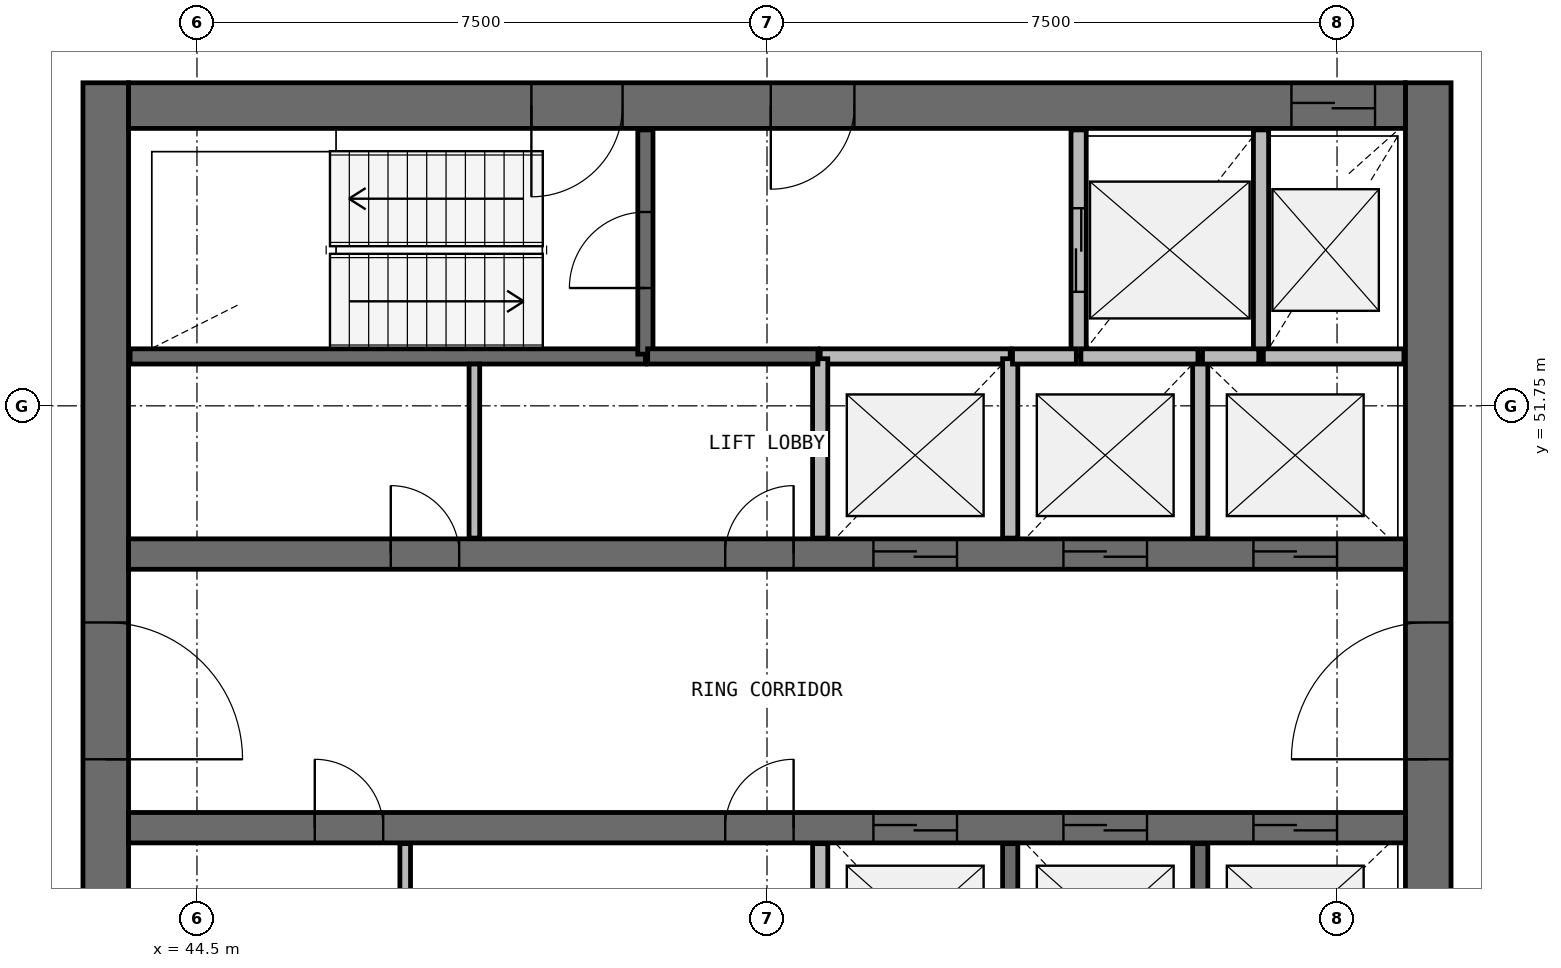
"""IFC4 building model, lengths in metres.
Left out: names, types, materials, properties, quantities, classifications, styles, units other than length and angle.
Written with IfcOpenShell. Run it as: python <this file> out.ifc"""

import sys

from ifc_helpers import new_model, si_unit, direction, frame, frame_2d, origin, place, context, subcontext, project, spatial, rectangle, extrude, source, transform, mapped, element, fill, save


model = new_model("IFC4")
c1 = context("Model", 3, precision=1e-05, world=origin(), true_north=direction((0.0, 1.0)))
c2 = subcontext(c1, "Body", "Model", "MODEL_VIEW")
j1 = project(units=[si_unit("LENGTHUNIT", "METRE"), si_unit("PLANEANGLEUNIT", "RADIAN")], contexts=[c1])
p1 = place(None, origin())
s1 = spatial("IfcSite", under=j1, at=p1, CompositionType="ELEMENT")
p2 = place(p1, origin())
s2 = spatial("IfcBuilding", under=s1, at=p2, CompositionType="ELEMENT")
p3 = place(p2, frame((0.0, 0.0, 222.8)))
s3 = spatial("IfcBuildingStorey", under=s2, at=p3, CompositionType="ELEMENT", Elevation=222.8)
p4 = place(p3, frame((60.7, 40.0, 0.0), z_axis=(0.0, 0.0, 1.0), x_axis=(0.0, 1.0, 0.0)))
e1 = element("IfcWall", 1, at=p4, inside=s3, PredefinedType="SHEAR", context=c2, shape_type="SweptSolid", body=[
    extrude(rectangle(XDim=16.0, YDim=0.6, at=frame_2d((8.0, 0.0))), origin(), (0.0, 0.0, 1.0), 3.9),
])
p5 = place(p4, frame((7.1, 0.0, 0.0)))
e2 = element("IfcOpeningElement", 2, at=p5, cuts=e1, PredefinedType="OPENING", context=c2, shape_type="SweptSolid", body=[
    extrude(rectangle(XDim=1.8, YDim=2.1, at=frame_2d((0.9, 1.05))), frame((0.0, 0.31, 0.0), z_axis=(0.0, -1.0, 0.0), x_axis=(1.0, 0.0, 0.0)), (0.0, 0.0, 1.0), 0.62),
])
p6 = place(p3, frame((43.3, 56.0, 0.0), z_axis=(0.0, 0.0, 1.0), x_axis=(0.0, -1.0, 0.0)))
e3 = element("IfcWall", 3, at=p6, inside=s3, PredefinedType="SHEAR", context=c2, shape_type="SweptSolid", body=[
    extrude(rectangle(XDim=16.0, YDim=0.6, at=frame_2d((8.0, 0.0))), origin(), (0.0, 0.0, 1.0), 3.9),
])
p7 = place(p6, frame((7.1, 0.0, 0.0)))
e4 = element("IfcOpeningElement", 4, at=p7, cuts=e3, PredefinedType="OPENING", context=c2, shape_type="SweptSolid", body=[
    extrude(rectangle(XDim=1.8, YDim=2.1, at=frame_2d((0.9, 1.05))), frame((0.0, 0.31, 0.0), z_axis=(0.0, -1.0, 0.0), x_axis=(1.0, 0.0, 0.0)), (0.0, 0.0, 1.0), 0.62),
])
p8 = place(p3, frame((60.4, 55.7, 0.0), z_axis=(0.0, 0.0, 1.0), x_axis=(-1.0, 0.0, 0.0)))
e5 = element("IfcWall", 5, at=p8, inside=s3, PredefinedType="SHEAR", context=c2, shape_type="SweptSolid", body=[
    extrude(rectangle(XDim=16.8, YDim=0.6, at=frame_2d((8.4, 0.0))), origin(), (0.0, 0.0, 1.0), 3.9),
])
p9 = place(p8, frame((0.4, 0.0, 0.0)))
e6 = element("IfcOpeningElement", 6, at=p9, cuts=e5, PredefinedType="OPENING", context=c2, shape_type="SweptSolid", body=[
    extrude(rectangle(XDim=1.1, YDim=2.1, at=frame_2d((0.55, 1.05))), frame((0.0, 0.31, 0.0), z_axis=(0.0, -1.0, 0.0), x_axis=(1.0, 0.0, 0.0)), (0.0, 0.0, 1.0), 0.62),
])
p10 = place(p8, frame((10.3, 0.0, 0.0)))
e7 = element("IfcOpeningElement", 7, at=p10, cuts=e5, PredefinedType="OPENING", context=c2, shape_type="SweptSolid", body=[
    extrude(rectangle(XDim=1.2, YDim=2.1, at=frame_2d((0.6, 1.05))), frame((0.0, 0.31, 0.0), z_axis=(0.0, -1.0, 0.0), x_axis=(1.0, 0.0, 0.0)), (0.0, 0.0, 1.0), 0.62),
])
p11 = place(p8, frame((7.25, 0.0, 0.0)))
e8 = element("IfcOpeningElement", 8, at=p11, cuts=e5, PredefinedType="OPENING", context=c2, shape_type="SweptSolid", body=[
    extrude(rectangle(XDim=1.1, YDim=2.1, at=frame_2d((0.55, 1.05))), frame((0.0, 0.31, 0.0), z_axis=(0.0, -1.0, 0.0), x_axis=(1.0, 0.0, 0.0)), (0.0, 0.0, 1.0), 0.62),
])
p12 = place(p3, frame((43.6, 49.8, 0.0), z_axis=(0.0, 0.0, 1.0), x_axis=(1.0, 0.0, 0.0)))
e9 = element("IfcWall", 9, at=p12, inside=s3, PredefinedType="SHEAR", context=c2, shape_type="SweptSolid", body=[
    extrude(rectangle(XDim=16.8, YDim=0.4, at=frame_2d((8.4, 0.0))), origin(), (0.0, 0.0, 1.0), 3.9),
])
p13 = place(p12, frame((9.8, 0.0, 0.0)))
e10 = element("IfcOpeningElement", 10, at=p13, cuts=e9, PredefinedType="OPENING", context=c2, shape_type="SweptSolid", body=[
    extrude(rectangle(XDim=1.1, YDim=2.1, at=frame_2d((0.55, 1.05))), frame((0.0, 0.21, 0.0), z_axis=(0.0, -1.0, 0.0), x_axis=(1.0, 0.0, 0.0)), (0.0, 0.0, 1.0), 0.42),
])
p14 = place(p12, frame((12.3, 0.0, 0.0)))
e11 = element("IfcOpeningElement", 11, at=p14, cuts=e9, PredefinedType="OPENING", context=c2, shape_type="SweptSolid", body=[
    extrude(rectangle(XDim=1.1, YDim=2.1, at=frame_2d((0.55, 1.05))), frame((0.0, 0.21, 0.0), z_axis=(0.0, -1.0, 0.0), x_axis=(1.0, 0.0, 0.0)), (0.0, 0.0, 1.0), 0.42),
])
p15 = place(p12, frame((14.8, 0.0, 0.0)))
e12 = element("IfcOpeningElement", 12, at=p15, cuts=e9, PredefinedType="OPENING", context=c2, shape_type="SweptSolid", body=[
    extrude(rectangle(XDim=1.1, YDim=2.1, at=frame_2d((0.55, 1.05))), frame((0.0, 0.21, 0.0), z_axis=(0.0, -1.0, 0.0), x_axis=(1.0, 0.0, 0.0)), (0.0, 0.0, 1.0), 0.42),
])
p16 = place(p12, frame((3.45, 0.0, 0.0)))
e13 = element("IfcOpeningElement", 13, at=p16, cuts=e9, PredefinedType="OPENING", context=c2, shape_type="SweptSolid", body=[
    extrude(rectangle(XDim=0.9, YDim=2.1, at=frame_2d((0.45, 1.05))), frame((0.0, 0.21, 0.0), z_axis=(0.0, -1.0, 0.0), x_axis=(1.0, 0.0, 0.0)), (0.0, 0.0, 1.0), 0.42),
])
p17 = place(p12, frame((7.85, 0.0, 0.0)))
e14 = element("IfcOpeningElement", 14, at=p17, cuts=e9, PredefinedType="OPENING", context=c2, shape_type="SweptSolid", body=[
    extrude(rectangle(XDim=0.9, YDim=2.1, at=frame_2d((0.45, 1.05))), frame((0.0, 0.21, 0.0), z_axis=(0.0, -1.0, 0.0), x_axis=(1.0, 0.0, 0.0)), (0.0, 0.0, 1.0), 0.42),
])
p18 = place(p3, frame((43.6, 46.2, 0.0), z_axis=(0.0, 0.0, 1.0), x_axis=(1.0, 0.0, 0.0)))
e15 = element("IfcWall", 15, at=p18, inside=s3, PredefinedType="SHEAR", context=c2, shape_type="SweptSolid", body=[
    extrude(rectangle(XDim=16.8, YDim=0.4, at=frame_2d((8.4, 0.0))), origin(), (0.0, 0.0, 1.0), 3.9),
])
p19 = place(p18, frame((9.8, 0.0, 0.0)))
e16 = element("IfcOpeningElement", 16, at=p19, cuts=e15, PredefinedType="OPENING", context=c2, shape_type="SweptSolid", body=[
    extrude(rectangle(XDim=1.1, YDim=2.1, at=frame_2d((0.55, 1.05))), frame((0.0, 0.21, 0.0), z_axis=(0.0, -1.0, 0.0), x_axis=(1.0, 0.0, 0.0)), (0.0, 0.0, 1.0), 0.42),
])
p20 = place(p18, frame((12.3, 0.0, 0.0)))
e17 = element("IfcOpeningElement", 17, at=p20, cuts=e15, PredefinedType="OPENING", context=c2, shape_type="SweptSolid", body=[
    extrude(rectangle(XDim=1.1, YDim=2.1, at=frame_2d((0.55, 1.05))), frame((0.0, 0.21, 0.0), z_axis=(0.0, -1.0, 0.0), x_axis=(1.0, 0.0, 0.0)), (0.0, 0.0, 1.0), 0.42),
])
p21 = place(p18, frame((14.8, 0.0, 0.0)))
e18 = element("IfcOpeningElement", 18, at=p21, cuts=e15, PredefinedType="OPENING", context=c2, shape_type="SweptSolid", body=[
    extrude(rectangle(XDim=1.1, YDim=2.1, at=frame_2d((0.55, 1.05))), frame((0.0, 0.21, 0.0), z_axis=(0.0, -1.0, 0.0), x_axis=(1.0, 0.0, 0.0)), (0.0, 0.0, 1.0), 0.42),
])
p22 = place(p18, frame((2.45, 0.0, 0.0)))
e19 = element("IfcOpeningElement", 19, at=p22, cuts=e15, PredefinedType="OPENING", context=c2, shape_type="SweptSolid", body=[
    extrude(rectangle(XDim=0.9, YDim=2.1, at=frame_2d((0.45, 1.05))), frame((0.0, 0.21, 0.0), z_axis=(0.0, -1.0, 0.0), x_axis=(1.0, 0.0, 0.0)), (0.0, 0.0, 1.0), 0.42),
])
p23 = place(p18, frame((7.85, 0.0, 0.0)))
e20 = element("IfcOpeningElement", 20, at=p23, cuts=e15, PredefinedType="OPENING", context=c2, shape_type="SweptSolid", body=[
    extrude(rectangle(XDim=0.9, YDim=2.1, at=frame_2d((0.45, 1.05))), frame((0.0, 0.21, 0.0), z_axis=(0.0, -1.0, 0.0), x_axis=(1.0, 0.0, 0.0)), (0.0, 0.0, 1.0), 0.42),
])
p24 = place(p3, frame((43.62, 52.4, 0.0), z_axis=(0.0, 0.0, 1.0), x_axis=(1.0, 0.0, 0.0)))
e21 = element("IfcWall", 21, at=p24, inside=s3, PredefinedType="SOLIDWALL", context=c2, shape_type="SweptSolid", body=[
    extrude(rectangle(XDim=6.78, YDim=0.2, at=frame_2d((3.39, 0.0))), origin(), (0.0, 0.0, 1.0), 3.58),
])
p25 = place(p3, frame((50.4, 52.43, 0.0), z_axis=(0.0, 0.0, 1.0), x_axis=(0.0, 1.0, 0.0)))
e22 = element("IfcWall", 22, at=p25, inside=s3, PredefinedType="SOLIDWALL", context=c2, shape_type="SweptSolid", body=[
    extrude(rectangle(XDim=2.95, YDim=0.2, at=frame_2d((1.475, 0.0))), origin(), (0.0, 0.0, 1.0), 3.58),
])
p26 = place(p25, frame((0.87, 0.0, 0.0)))
e23 = element("IfcOpeningElement", 23, at=p26, cuts=e22, PredefinedType="OPENING", context=c2, shape_type="SweptSolid", body=[
    extrude(rectangle(XDim=1.0, YDim=2.1, at=frame_2d((0.5, 1.05))), frame((0.0, 0.11, 0.0), z_axis=(0.0, -1.0, 0.0), x_axis=(1.0, 0.0, 0.0)), (0.0, 0.0, 1.0), 0.22),
])
p27 = place(p3, frame((56.1, 55.38, 0.0), z_axis=(0.0, 0.0, 1.0), x_axis=(0.0, -1.0, 0.0)))
e24 = element("IfcWall", 24, at=p27, inside=s3, PredefinedType="SOLIDWALL", context=c2, shape_type="SweptSolid", body=[
    extrude(rectangle(XDim=2.98, YDim=0.2, at=frame_2d((1.49, 0.0))), origin(), (0.0, 0.0, 1.0), 3.58),
])
p28 = place(p27, frame((1.03, 0.0, 0.0)))
e25 = element("IfcOpeningElement", 25, at=p28, cuts=e24, PredefinedType="OPENING", context=c2, shape_type="SweptSolid", body=[
    extrude(rectangle(XDim=1.1, YDim=2.1, at=frame_2d((0.55, 1.05))), frame((0.0, 0.11, 0.0), z_axis=(0.0, -1.0, 0.0), x_axis=(1.0, 0.0, 0.0)), (0.0, 0.0, 1.0), 0.22),
])
p29 = place(p3, frame((58.5, 52.4, 0.0), z_axis=(0.0, 0.0, 1.0), x_axis=(0.0, 1.0, 0.0)))
e26 = element("IfcWall", 26, at=p29, inside=s3, PredefinedType="SOLIDWALL", context=c2, shape_type="SweptSolid", body=[
    extrude(rectangle(XDim=2.98, YDim=0.2, at=frame_2d((1.49, 0.0))), origin(), (0.0, 0.0, 1.0), 3.58),
])
p30 = place(p3, frame((55.2, 52.4, 0.0), z_axis=(0.0, 0.0, 1.0), x_axis=(-1.0, 0.0, 0.0)))
e27 = element("IfcWall", 27, at=p30, inside=s3, PredefinedType="SOLIDWALL", context=c2, shape_type="SweptSolid", body=[
    extrude(rectangle(XDim=2.5, YDim=0.2, at=frame_2d((1.25, 0.0))), origin(), (0.0, 0.0, 1.0), 3.58),
])
for number, where, z_axis, x_axis in (
    (28, (52.7, 45.99, 0.0), (0.0, 0.0, 1.0), (0.0, -1.0, 0.0)),
    (29, (52.7, 52.37, 0.0), (0.0, 0.0, 1.0), (0.0, -1.0, 0.0)),
    (30, (55.2, 43.63, 0.0), (0.0, 0.0, 1.0), (0.0, 1.0, 0.0)),
    (31, (55.2, 50.01, 0.0), (0.0, 0.0, 1.0), (0.0, 1.0, 0.0)),
    (32, (57.7, 43.63, 0.0), (0.0, 0.0, 1.0), (0.0, 1.0, 0.0)),
):
    element("IfcWall", number, at=place(p3, frame(where, z_axis=z_axis, x_axis=x_axis)), inside=s3, PredefinedType="SOLIDWALL", context=c2, shape_type="SweptSolid", body=[
        extrude(rectangle(XDim=2.36, YDim=0.2, at=frame_2d((1.18, 0.0))), origin(), (0.0, 0.0, 1.0), 3.58),
    ])
p31 = place(p3, frame((57.7, 50.01, 0.0), z_axis=(0.0, 0.0, 1.0), x_axis=(0.0, 1.0, 0.0)))
e33 = element("IfcWall", 33, at=p31, inside=s3, PredefinedType="SOLIDWALL", context=c2, shape_type="SweptSolid", body=[
    extrude(rectangle(XDim=2.39, YDim=0.2, at=frame_2d((1.195, 0.0))), origin(), (0.0, 0.0, 1.0), 3.58),
])
p32 = place(p3, frame((50.43, 52.4, 0.0), z_axis=(0.0, 0.0, 1.0), x_axis=(1.0, 0.0, 0.0)))
e34 = element("IfcWall", 34, at=p32, inside=s3, PredefinedType="SOLIDWALL", context=c2, shape_type="SweptSolid", body=[
    extrude(rectangle(XDim=2.24, YDim=0.2, at=frame_2d((1.12, 0.0))), origin(), (0.0, 0.0, 1.0), 3.58),
])
p33 = place(p3, frame((60.38, 52.4, 0.0), z_axis=(0.0, 0.0, 1.0), x_axis=(-1.0, 0.0, 0.0)))
e35 = element("IfcWall", 35, at=p33, inside=s3, PredefinedType="SOLIDWALL", context=c2, shape_type="SweptSolid", body=[
    extrude(rectangle(XDim=1.85, YDim=0.2, at=frame_2d((0.925, 0.0))), origin(), (0.0, 0.0, 1.0), 3.58),
])
p34 = place(p3, frame((57.67, 52.4, 0.0), z_axis=(0.0, 0.0, 1.0), x_axis=(-1.0, 0.0, 0.0)))
e36 = element("IfcWall", 36, at=p34, inside=s3, PredefinedType="SOLIDWALL", context=c2, shape_type="SweptSolid", body=[
    extrude(rectangle(XDim=1.54, YDim=0.2, at=frame_2d((0.77, 0.0))), origin(), (0.0, 0.0, 1.0), 3.58),
])
p35 = place(p3, frame((56.07, 52.4, 0.0), z_axis=(0.0, 0.0, 1.0), x_axis=(-1.0, 0.0, 0.0)))
e37 = element("IfcWall", 37, at=p35, inside=s3, PredefinedType="SOLIDWALL", context=c2, shape_type="SweptSolid", body=[
    extrude(rectangle(XDim=0.84, YDim=0.2, at=frame_2d((0.42, 0.0))), origin(), (0.0, 0.0, 1.0), 3.58),
])
p36 = place(p3, frame((58.47, 52.4, 0.0), z_axis=(0.0, 0.0, 1.0), x_axis=(-1.0, 0.0, 0.0)))
e38 = element("IfcWall", 38, at=p36, inside=s3, PredefinedType="SOLIDWALL", context=c2, shape_type="SweptSolid", body=[
    extrude(rectangle(XDim=0.74, YDim=0.2, at=frame_2d((0.37, 0.0))), origin(), (0.0, 0.0, 1.0), 3.58),
])
for number, where, z_axis, x_axis in (
    (39, (47.24, 43.7, 0.0), (0.0, 0.0, 1.0), (0.0, 1.0, 0.0)),
    (40, (48.15, 50.01, 0.0), (0.0, 0.0, 1.0), (0.0, 1.0, 0.0)),
):
    element("IfcWall", number, at=place(p3, frame(where, z_axis=z_axis, x_axis=x_axis)), inside=s3, PredefinedType="PARTITIONING", context=c2, shape_type="SweptSolid", body=[
        extrude(rectangle(XDim=2.29, YDim=0.14, at=frame_2d((1.145, 0.0))), origin(), (0.0, 0.0, 1.0), 2.88),
    ])
m1 = source(origin(), c2, "Body", "SweptSolid", [
    extrude(rectangle(XDim=1.8, YDim=2.1, at=frame_2d((0.9, 1.05))), frame((0.0, 0.025, 0.0), z_axis=(0.0, -1.0, 0.0), x_axis=(1.0, 0.0, 0.0)), (0.0, 0.0, 1.0), 0.05),
])
p37 = place(p7, origin())
e41 = element("IfcDoor", 41, at=p37, inside=s3, OperationType="SINGLE_SWING_RIGHT", PredefinedType="DOOR", context=c2, shape_type="MappedRepresentation", body=[
    mapped(m1, transform((0.0, 0.0, 0.0), scale=1.0)),
])
fill(e4, e41)
p38 = place(p5, origin())
e42 = element("IfcDoor", 42, at=p38, inside=s3, OperationType="SINGLE_SWING_LEFT", PredefinedType="DOOR", context=c2, shape_type="MappedRepresentation", body=[
    mapped(m1, transform((0.0, 0.0, 0.0), scale=1.0)),
])
fill(e2, e42)
m2 = source(origin(), c2, "Body", "SweptSolid", [
    extrude(rectangle(XDim=1.1, YDim=2.1, at=frame_2d((0.55, 1.05))), frame((0.0, 0.025, 0.0), z_axis=(0.0, -1.0, 0.0), x_axis=(1.0, 0.0, 0.0)), (0.0, 0.0, 1.0), 0.05),
])
p39 = place(p13, origin())
e43 = element("IfcDoor", 43, at=p39, inside=s3, OperationType="DOUBLE_DOOR_SLIDING", PredefinedType="USERDEFINED", context=c2, shape_type="MappedRepresentation", body=[
    mapped(m2, transform((0.0, 0.0, 0.0), scale=1.0)),
])
fill(e10, e43)
p40 = place(p14, origin())
e44 = element("IfcDoor", 44, at=p40, inside=s3, OperationType="DOUBLE_DOOR_SLIDING", PredefinedType="USERDEFINED", context=c2, shape_type="MappedRepresentation", body=[
    mapped(m2, transform((0.0, 0.0, 0.0), scale=1.0)),
])
fill(e11, e44)
p41 = place(p15, origin())
e45 = element("IfcDoor", 45, at=p41, inside=s3, OperationType="DOUBLE_DOOR_SLIDING", PredefinedType="USERDEFINED", context=c2, shape_type="MappedRepresentation", body=[
    mapped(m2, transform((0.0, 0.0, 0.0), scale=1.0)),
])
fill(e12, e45)
p42 = place(p19, origin())
e46 = element("IfcDoor", 46, at=p42, inside=s3, OperationType="DOUBLE_DOOR_SLIDING", PredefinedType="USERDEFINED", context=c2, shape_type="MappedRepresentation", body=[
    mapped(m2, transform((0.0, 0.0, 0.0), scale=1.0)),
])
fill(e16, e46)
p43 = place(p20, origin())
e47 = element("IfcDoor", 47, at=p43, inside=s3, OperationType="DOUBLE_DOOR_SLIDING", PredefinedType="USERDEFINED", context=c2, shape_type="MappedRepresentation", body=[
    mapped(m2, transform((0.0, 0.0, 0.0), scale=1.0)),
])
fill(e17, e47)
p44 = place(p21, origin())
e48 = element("IfcDoor", 48, at=p44, inside=s3, OperationType="DOUBLE_DOOR_SLIDING", PredefinedType="USERDEFINED", context=c2, shape_type="MappedRepresentation", body=[
    mapped(m2, transform((0.0, 0.0, 0.0), scale=1.0)),
])
fill(e18, e48)
p45 = place(p28, origin())
e49 = element("IfcDoor", 49, at=p45, inside=s3, OperationType="DOUBLE_DOOR_SLIDING", PredefinedType="USERDEFINED", context=c2, shape_type="MappedRepresentation", body=[
    mapped(m2, transform((0.0, 0.0, 0.0), scale=1.0)),
])
fill(e25, e49)
p46 = place(p9, origin())
e50 = element("IfcDoor", 50, at=p46, inside=s3, OperationType="DOUBLE_DOOR_SLIDING", PredefinedType="USERDEFINED", context=c2, shape_type="MappedRepresentation", body=[
    mapped(m2, transform((0.0, 0.0, 0.0), scale=1.0)),
])
fill(e6, e50)
m3 = source(origin(), c2, "Body", "SweptSolid", [
    extrude(rectangle(XDim=1.2, YDim=2.1, at=frame_2d((0.6, 1.05))), frame((0.0, 0.025, 0.0), z_axis=(0.0, -1.0, 0.0), x_axis=(1.0, 0.0, 0.0)), (0.0, 0.0, 1.0), 0.05),
])
p47 = place(p10, origin())
e51 = element("IfcDoor", 51, at=p47, inside=s3, OperationType="SINGLE_SWING_RIGHT", PredefinedType="DOOR", context=c2, shape_type="MappedRepresentation", body=[
    mapped(m3, transform((0.0, 0.0, 0.0), scale=1.0)),
])
fill(e7, e51)
m4 = source(origin(), c2, "Body", "SweptSolid", [
    extrude(rectangle(XDim=1.0, YDim=2.1, at=frame_2d((0.5, 1.05))), frame((0.0, 0.025, 0.0), z_axis=(0.0, -1.0, 0.0), x_axis=(1.0, 0.0, 0.0)), (0.0, 0.0, 1.0), 0.05),
])
p48 = place(p26, origin())
e52 = element("IfcDoor", 52, at=p48, inside=s3, OperationType="SINGLE_SWING_LEFT", PredefinedType="DOOR", context=c2, shape_type="MappedRepresentation", body=[
    mapped(m4, transform((0.0, 0.0, 0.0), scale=1.0)),
])
fill(e23, e52)
m5 = source(origin(), c2, "Body", "SweptSolid", [
    extrude(rectangle(XDim=1.1, YDim=2.1, at=frame_2d((0.55, 1.05))), frame((0.0, 0.025, 0.0), z_axis=(0.0, -1.0, 0.0), x_axis=(1.0, 0.0, 0.0)), (0.0, 0.0, 1.0), 0.05),
])
p49 = place(p11, origin())
e53 = element("IfcDoor", 53, at=p49, inside=s3, OperationType="SINGLE_SWING_RIGHT", PredefinedType="DOOR", context=c2, shape_type="MappedRepresentation", body=[
    mapped(m5, transform((0.0, 0.0, 0.0), scale=1.0)),
])
fill(e8, e53)
m6 = source(origin(), c2, "Body", "SweptSolid", [
    extrude(rectangle(XDim=0.9, YDim=2.1, at=frame_2d((0.45, 1.05))), frame((0.0, 0.025, 0.0), z_axis=(0.0, -1.0, 0.0), x_axis=(1.0, 0.0, 0.0)), (0.0, 0.0, 1.0), 0.05),
])
p50 = place(p16, origin())
e54 = element("IfcDoor", 54, at=p50, inside=s3, OperationType="SINGLE_SWING_LEFT", PredefinedType="DOOR", context=c2, shape_type="MappedRepresentation", body=[
    mapped(m6, transform((0.0, 0.0, 0.0), scale=1.0)),
])
fill(e13, e54)
p51 = place(p17, origin())
e55 = element("IfcDoor", 55, at=p51, inside=s3, OperationType="SINGLE_SWING_RIGHT", PredefinedType="DOOR", context=c2, shape_type="MappedRepresentation", body=[
    mapped(m6, transform((0.0, 0.0, 0.0), scale=1.0)),
])
fill(e14, e55)
p52 = place(p22, origin())
e56 = element("IfcDoor", 56, at=p52, inside=s3, OperationType="SINGLE_SWING_LEFT", PredefinedType="DOOR", context=c2, shape_type="MappedRepresentation", body=[
    mapped(m6, transform((0.0, 0.0, 0.0), scale=1.0)),
])
fill(e19, e56)
p53 = place(p23, origin())
e57 = element("IfcDoor", 57, at=p53, inside=s3, OperationType="SINGLE_SWING_RIGHT", PredefinedType="DOOR", context=c2, shape_type="MappedRepresentation", body=[
    mapped(m6, transform((0.0, 0.0, 0.0), scale=1.0)),
])
fill(e20, e57)
save(model, sys.argv[1])
